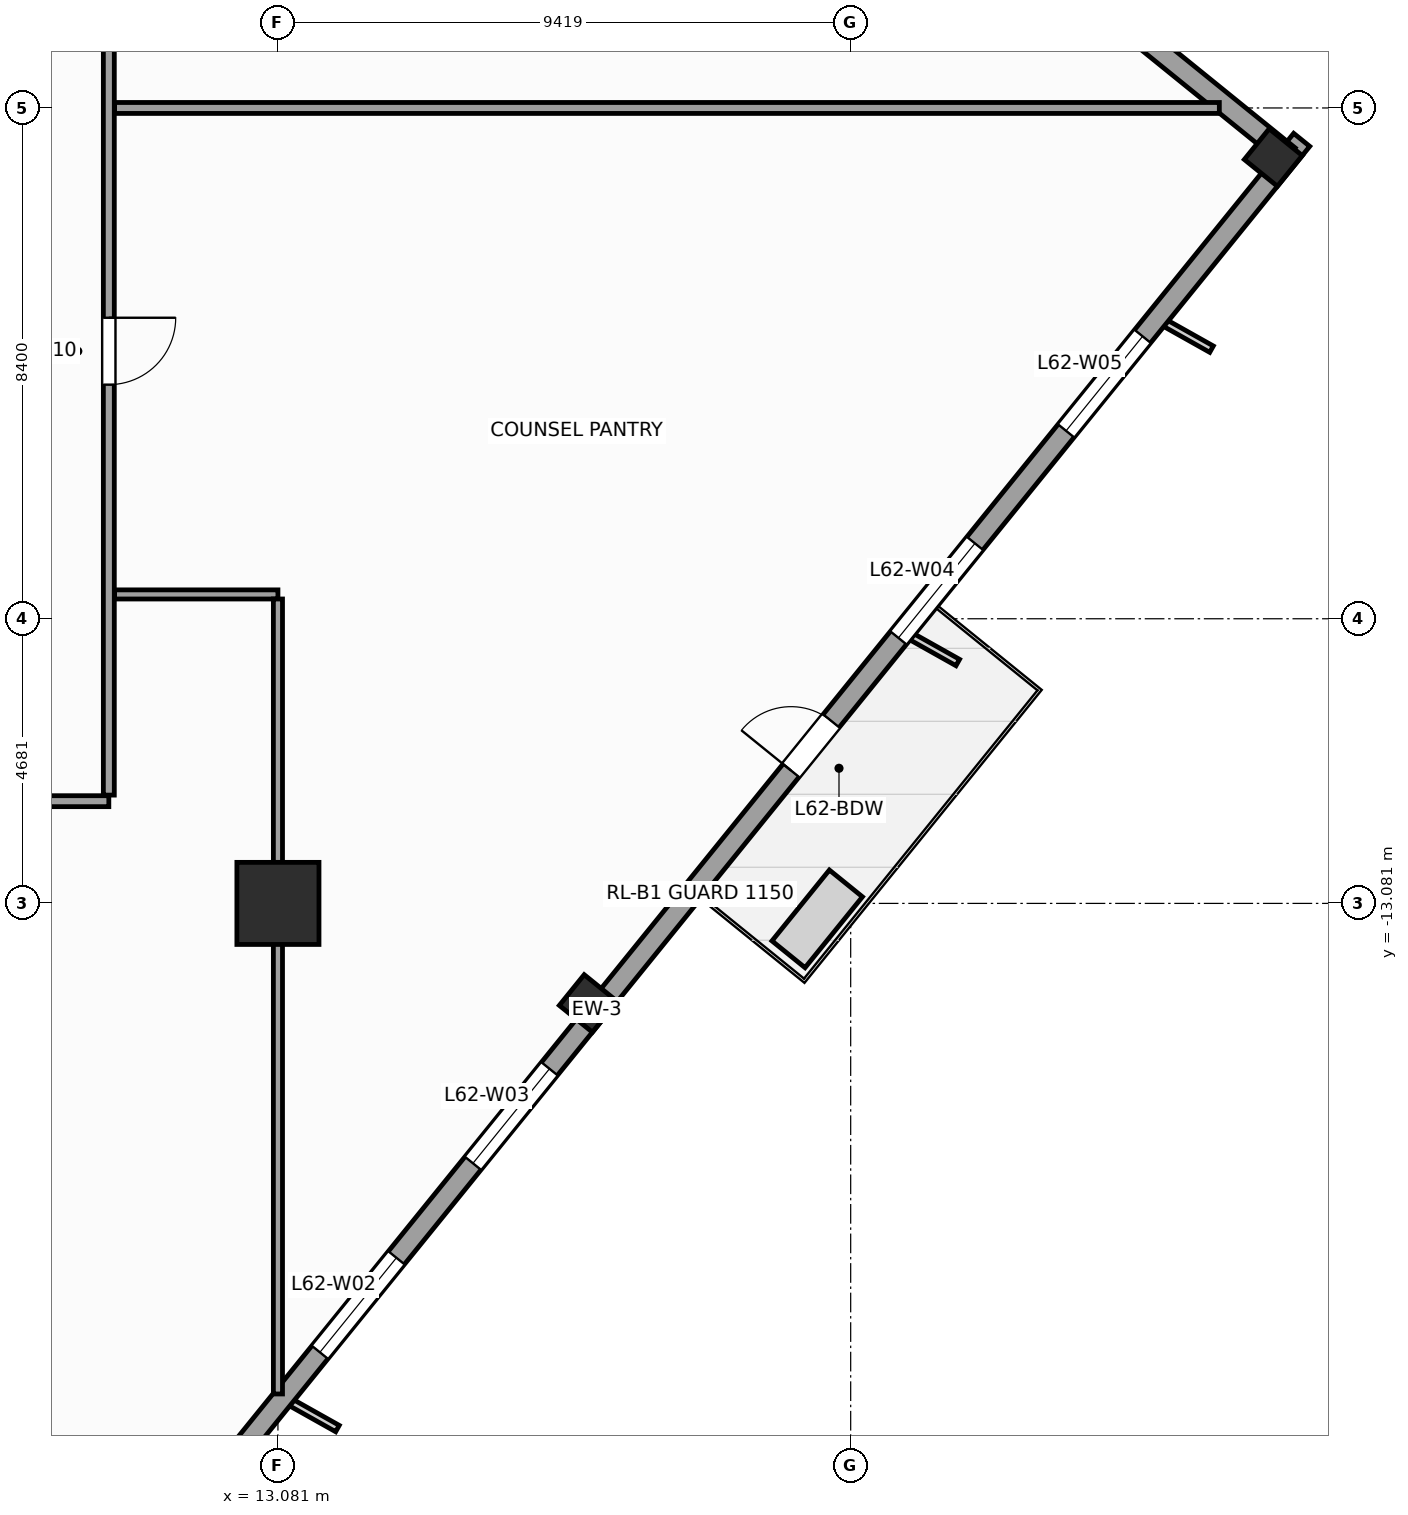
"""IFC4 building model, lengths in metres.
Left out: names, types, materials, properties, quantities, classifications, styles, units other than length and angle.
Written with IfcOpenShell. Run it as: python <this file> out.ifc"""

import sys

from ifc_helpers import new_model, si_unit, direction, frame, frame_2d, origin, origin_2d, place, context, subcontext, project, spatial, rectangle, extrude, source, transform, mapped, element, fill, save


model = new_model("IFC4")
c1 = context("Model", 3, precision=1e-05, world=origin(), true_north=direction((0.0, 1.0)))
c2 = subcontext(c1, "Body", "Model", "MODEL_VIEW")
j1 = project(units=[si_unit("LENGTHUNIT", "METRE"), si_unit("PLANEANGLEUNIT", "RADIAN")], contexts=[c1])
p1 = place(None, origin())
s1 = spatial("IfcSite", under=j1, at=p1, CompositionType="ELEMENT")
p2 = place(p1, origin())
s2 = spatial("IfcBuilding", under=s1, at=p2, CompositionType="ELEMENT")
p3 = place(p2, frame((0.0, 0.0, 256.3)))
s3 = spatial("IfcBuildingStorey", under=s2, at=p3, CompositionType="ELEMENT", Elevation=256.3)
m1 = source(origin(), c2, "Body", "SweptSolid", [
    extrude(rectangle(XDim=1.35, YDim=1.35, at=origin_2d()), origin(), (0.0, 0.0, 1.0), 3.9),
])
p4 = place(p3, frame((13.081, -13.081, 0.0), z_axis=(0.0, 0.0, 1.0), x_axis=(1.0, 0.0, 0.0)))
e1 = element("IfcColumn", 1, at=p4, inside=s3, PredefinedType="COLUMN", context=c2, shape_type="MappedRepresentation", body=[
    mapped(m1, transform((0.0, 0.0, 0.0), scale=1.0)),
])
m2 = source(origin(), c2, "Body", "SweptSolid", [
    extrude(rectangle(XDim=0.65, YDim=0.7, at=origin_2d()), origin(), (0.0, 0.0, 1.0), 3.9),
])
for number, where, z_axis, x_axis in (
    (2, (18.185, -14.726, 0.0), (0.0, 0.0, 1.0), (0.629, 0.777, 0.0)),
    (3, (29.45, -0.815, 0.0), (0.0, 0.0, 1.0), (0.629, 0.777, 0.0)),
):
    element("IfcColumn", number, at=place(p3, frame(where, z_axis=z_axis, x_axis=x_axis)), inside=s3, PredefinedType="COLUMN", context=c2, shape_type="MappedRepresentation", body=[
        mapped(m2, transform((0.0, 0.0, 0.0), scale=1.0)),
    ])
p5 = place(p3, frame((6.733, -29.154, 0.0), z_axis=(0.0, 0.0, 1.0), x_axis=(0.629325378072, 0.77714192302, 0.0)))
e4 = element("IfcWall", 4, at=p5, inside=s3, PredefinedType="STANDARD", context=c2, shape_type="SweptSolid", body=[
    extrude(rectangle(XDim=36.84, YDim=0.34, at=frame_2d((18.42, 0.0))), origin(), (0.0, 0.0, 1.0), 2.02),
])
p6 = place(p5, frame((23.495, 0.0, 0.0)))
e5 = element("IfcOpeningElement", 5, at=p6, cuts=e4, PredefinedType="OPENING", context=c2, shape_type="SweptSolid", body=[
    extrude(rectangle(XDim=1.05, YDim=2.02, at=frame_2d((0.525, 1.01))), frame((0.0, 0.18, 0.0), z_axis=(0.0, -1.0, 0.0), x_axis=(1.0, 0.0, 0.0)), (0.0, 0.0, 1.0), 0.36),
])
p7 = place(p5, frame((3.421, 0.0, 0.49)))
e6 = element("IfcOpeningElement", 6, at=p7, cuts=e4, PredefinedType="OPENING", context=c2, shape_type="SweptSolid", body=[
    extrude(rectangle(XDim=2.0, YDim=1.45, at=frame_2d((1.0, 0.725))), frame((0.0, 0.18, 0.0), z_axis=(0.0, -1.0, 0.0), x_axis=(1.0, 0.0, 0.0)), (0.0, 0.0, 1.0), 0.36),
])
p8 = place(p5, frame((11.184, 0.0, 0.49)))
e7 = element("IfcOpeningElement", 7, at=p8, cuts=e4, PredefinedType="OPENING", context=c2, shape_type="SweptSolid", body=[
    extrude(rectangle(XDim=2.0, YDim=1.45, at=frame_2d((1.0, 0.725))), frame((0.0, 0.18, 0.0), z_axis=(0.0, -1.0, 0.0), x_axis=(1.0, 0.0, 0.0)), (0.0, 0.0, 1.0), 0.36),
])
p9 = place(p5, frame((15.183, 0.0, 0.49)))
e8 = element("IfcOpeningElement", 8, at=p9, cuts=e4, PredefinedType="OPENING", context=c2, shape_type="SweptSolid", body=[
    extrude(rectangle(XDim=2.0, YDim=1.45, at=frame_2d((1.0, 0.725))), frame((0.0, 0.18, 0.0), z_axis=(0.0, -1.0, 0.0), x_axis=(1.0, 0.0, 0.0)), (0.0, 0.0, 1.0), 0.36),
])
p10 = place(p5, frame((26.301, 0.0, 0.49)))
e9 = element("IfcOpeningElement", 9, at=p10, cuts=e4, PredefinedType="OPENING", context=c2, shape_type="SweptSolid", body=[
    extrude(rectangle(XDim=2.0, YDim=1.45, at=frame_2d((1.0, 0.725))), frame((0.0, 0.18, 0.0), z_axis=(0.0, -1.0, 0.0), x_axis=(1.0, 0.0, 0.0)), (0.0, 0.0, 1.0), 0.36),
])
p11 = place(p5, frame((30.682, 0.0, 0.49)))
e10 = element("IfcOpeningElement", 10, at=p11, cuts=e4, PredefinedType="OPENING", context=c2, shape_type="SweptSolid", body=[
    extrude(rectangle(XDim=2.0, YDim=1.45, at=frame_2d((1.0, 0.725))), frame((0.0, 0.18, 0.0), z_axis=(0.0, -1.0, 0.0), x_axis=(1.0, 0.0, 0.0)), (0.0, 0.0, 1.0), 0.36),
])
p12 = place(p3, frame((29.703, -0.789, 0.0), z_axis=(0.0, 0.0, 1.0), x_axis=(-0.77714355312, 0.629323365087, 0.0)))
e11 = element("IfcWall", 11, at=p12, inside=s3, PredefinedType="STANDARD", context=c2, shape_type="SweptSolid", body=[
    extrude(rectangle(XDim=5.5, YDim=0.34, at=frame_2d((2.75, 0.0))), origin(), (0.0, 0.0, 1.0), 3.5),
])
p13 = place(p3, frame((-11.35, -11.4, 0.0), z_axis=(0.0, 0.0, 1.0), x_axis=(1.0, 0.0, 0.0)))
e12 = element("IfcWall", 12, at=p13, inside=s3, PredefinedType="PARTITIONING", context=c2, shape_type="SweptSolid", body=[
    extrude(rectangle(XDim=21.65, YDim=0.18, at=frame_2d((10.825, 0.0))), origin(), (0.0, 0.0, 1.0), 3.5),
])
p14 = place(p13, frame((1.455, 0.0, 0.0)))
e13 = element("IfcOpeningElement", 13, at=p14, cuts=e12, PredefinedType="OPENING", context=c2, shape_type="SweptSolid", body=[
    extrude(rectangle(XDim=0.95, YDim=2.1, at=frame_2d((0.475, 1.05))), frame((0.0, 0.1, 0.0), z_axis=(0.0, -1.0, 0.0), x_axis=(1.0, 0.0, 0.0)), (0.0, 0.0, 1.0), 0.2),
])
p15 = place(p13, frame((12.311, 0.0, 0.0)))
e14 = element("IfcOpeningElement", 14, at=p15, cuts=e12, PredefinedType="OPENING", context=c2, shape_type="SweptSolid", body=[
    extrude(rectangle(XDim=0.95, YDim=2.1, at=frame_2d((0.475, 1.05))), frame((0.0, 0.1, 0.0), z_axis=(0.0, -1.0, 0.0), x_axis=(1.0, 0.0, 0.0)), (0.0, 0.0, 1.0), 0.2),
])
p16 = place(p13, frame((17.06, 0.0, 0.0)))
e15 = element("IfcOpeningElement", 15, at=p16, cuts=e12, PredefinedType="OPENING", context=c2, shape_type="SweptSolid", body=[
    extrude(rectangle(XDim=1.1, YDim=2.2, at=frame_2d((0.55, 1.1))), frame((0.0, 0.1, 0.0), z_axis=(0.0, -1.0, 0.0), x_axis=(1.0, 0.0, 0.0)), (0.0, 0.0, 1.0), 0.2),
])
p17 = place(p13, frame((6.584, 0.0, 0.0)))
e16 = element("IfcOpeningElement", 16, at=p17, cuts=e12, PredefinedType="OPENING", context=c2, shape_type="SweptSolid", body=[
    extrude(rectangle(XDim=1.1, YDim=2.2, at=frame_2d((0.55, 1.1))), frame((0.0, 0.1, 0.0), z_axis=(0.0, -1.0, 0.0), x_axis=(1.0, 0.0, 0.0)), (0.0, 0.0, 1.0), 0.2),
])
p18 = place(p3, frame((10.3, -11.3, 0.0), z_axis=(0.0, 0.0, 1.0), x_axis=(0.0, 1.0, 0.0)))
e17 = element("IfcWall", 17, at=p18, inside=s3, PredefinedType="PARTITIONING", context=c2, shape_type="SweptSolid", body=[
    extrude(rectangle(XDim=23.65, YDim=0.18, at=frame_2d((11.825, 0.0))), origin(), (0.0, 0.0, 1.0), 3.5),
])
p19 = place(p18, frame((14.75, 0.0, 0.0)))
e18 = element("IfcOpeningElement", 18, at=p19, cuts=e17, PredefinedType="OPENING", context=c2, shape_type="SweptSolid", body=[
    extrude(rectangle(XDim=1.1, YDim=2.2, at=frame_2d((0.55, 1.1))), frame((0.0, 0.1, 0.0), z_axis=(0.0, -1.0, 0.0), x_axis=(1.0, 0.0, 0.0)), (0.0, 0.0, 1.0), 0.2),
])
p20 = place(p18, frame((6.75, 0.0, 0.0)))
e19 = element("IfcOpeningElement", 19, at=p20, cuts=e17, PredefinedType="OPENING", context=c2, shape_type="SweptSolid", body=[
    extrude(rectangle(XDim=1.1, YDim=2.2, at=frame_2d((0.55, 1.1))), frame((0.0, 0.1, 0.0), z_axis=(0.0, -1.0, 0.0), x_axis=(1.0, 0.0, 0.0)), (0.0, 0.0, 1.0), 0.2),
])
p21 = place(p3, frame((10.395, 0.0, 0.0), z_axis=(0.0, 0.0, 1.0), x_axis=(1.0, 0.0, 0.0)))
e20 = element("IfcWall", 20, at=p21, inside=s3, PredefinedType="PARTITIONING", context=c2, shape_type="SweptSolid", body=[
    extrude(rectangle(XDim=18.167, YDim=0.18, at=frame_2d((9.084, 0.0))), origin(), (0.0, 0.0, 1.0), 3.5),
])
p22 = place(p3, frame((10.395, -8.0, 0.0), z_axis=(0.0, 0.0, 1.0), x_axis=(1.0, 0.0, 0.0)))
e21 = element("IfcWall", 21, at=p22, inside=s3, PredefinedType="PARTITIONING", context=c2, shape_type="SweptSolid", body=[
    extrude(rectangle(XDim=2.686, YDim=0.15, at=frame_2d((1.343, 0.0))), origin(), (0.0, 0.0, 1.0), 3.5),
])
p23 = place(p3, frame((13.081, -8.075, 0.0), z_axis=(0.0, 0.0, 1.0), x_axis=(0.0, -1.0, 0.0)))
e22 = element("IfcWall", 22, at=p23, inside=s3, PredefinedType="PARTITIONING", context=c2, shape_type="SweptSolid", body=[
    extrude(rectangle(XDim=13.073, YDim=0.15, at=frame_2d((6.537, 0.0))), origin(), (0.0, 0.0, 1.0), 2.02),
])
m3 = source(origin(), c2, "Body", "SweptSolid", [
    extrude(rectangle(XDim=1.05, YDim=2.02, at=frame_2d((0.525, 1.01))), frame((0.0, 0.025, 0.0), z_axis=(0.0, -1.0, 0.0), x_axis=(1.0, 0.0, 0.0)), (0.0, 0.0, 1.0), 0.05),
])
p24 = place(p6, origin())
e23 = element("IfcDoor", 23, at=p24, inside=s3, OperationType="SINGLE_SWING_LEFT", PredefinedType="DOOR", context=c2, shape_type="MappedRepresentation", body=[
    mapped(m3, transform((0.0, 0.0, 0.0), scale=1.0)),
])
fill(e5, e23)
m4 = source(origin(), c2, "Body", "SweptSolid", [
    extrude(rectangle(XDim=2.0, YDim=1.45, at=frame_2d((1.0, 0.725))), frame((0.0, 0.03, 0.0), z_axis=(0.0, -1.0, 0.0), x_axis=(1.0, 0.0, 0.0)), (0.0, 0.0, 1.0), 0.06),
])
p25 = place(p8, origin())
e24 = element("IfcWindow", 24, at=p25, inside=s3, PartitioningType="SINGLE_PANEL", PredefinedType="WINDOW", context=c2, shape_type="MappedRepresentation", body=[
    mapped(m4, transform((0.0, 0.0, 0.0), scale=1.0)),
])
fill(e7, e24)
p26 = place(p9, origin())
e25 = element("IfcWindow", 25, at=p26, inside=s3, PartitioningType="SINGLE_PANEL", PredefinedType="WINDOW", context=c2, shape_type="MappedRepresentation", body=[
    mapped(m4, transform((0.0, 0.0, 0.0), scale=1.0)),
])
fill(e8, e25)
p27 = place(p10, origin())
e26 = element("IfcWindow", 26, at=p27, inside=s3, PartitioningType="SINGLE_PANEL", PredefinedType="WINDOW", context=c2, shape_type="MappedRepresentation", body=[
    mapped(m4, transform((0.0, 0.0, 0.0), scale=1.0)),
])
fill(e9, e26)
p28 = place(p11, origin())
e27 = element("IfcWindow", 27, at=p28, inside=s3, PartitioningType="SINGLE_PANEL", PredefinedType="WINDOW", context=c2, shape_type="MappedRepresentation", body=[
    mapped(m4, transform((0.0, 0.0, 0.0), scale=1.0)),
])
fill(e10, e27)
m5 = source(origin(), c2, "Body", "SweptSolid", [
    extrude(rectangle(XDim=1.1, YDim=2.2, at=frame_2d((0.55, 1.1))), frame((0.0, 0.025, 0.0), z_axis=(0.0, -1.0, 0.0), x_axis=(1.0, 0.0, 0.0)), (0.0, 0.0, 1.0), 0.05),
])
p29 = place(p20, frame((1.1, 0.0, 0.0), z_axis=(0.0, 0.0, 1.0), x_axis=(-1.0, 0.0, 0.0)))
e28 = element("IfcDoor", 28, at=p29, inside=s3, OperationType="SINGLE_SWING_RIGHT", PredefinedType="DOOR", context=c2, shape_type="MappedRepresentation", body=[
    mapped(m5, transform((0.0, 0.0, 0.0), scale=1.0)),
])
fill(e19, e28)
save(model, sys.argv[1])
